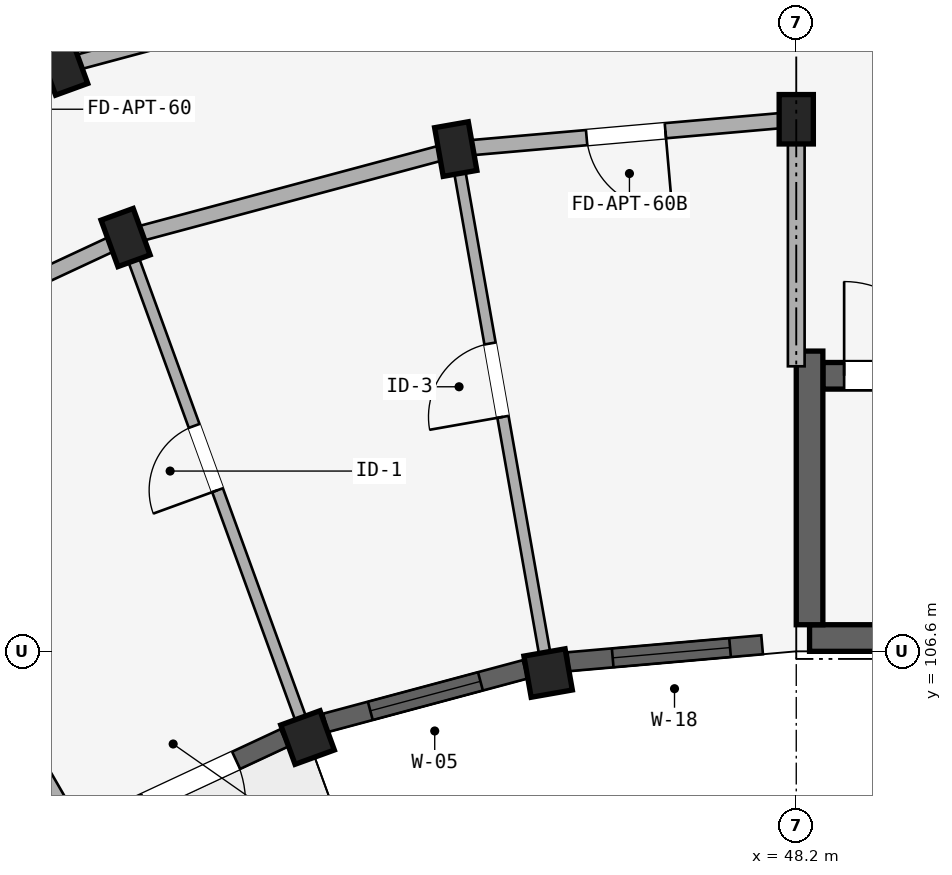
"""IFC4 building model, lengths in metres.
Left out: names, types, materials, properties, quantities, classifications, styles, units other than length and angle.
Written with IfcOpenShell. Run it as: python <this file> out.ifc"""

import sys

from ifc_helpers import new_model, si_unit, direction, frame, frame_2d, origin, origin_2d, place, context, subcontext, project, spatial, rectangle, extrude, element, fill, save


model = new_model("IFC4")
c1 = context("Model", 3, precision=1e-05, world=origin(), true_north=direction((0.0, 1.0)))
c2 = subcontext(c1, "Body", "Model", "MODEL_VIEW")
j1 = project(units=[si_unit("LENGTHUNIT", "METRE"), si_unit("PLANEANGLEUNIT", "RADIAN")], contexts=[c1])
p1 = place(None, origin())
s1 = spatial("IfcSite", under=j1, at=p1, CompositionType="ELEMENT")
p2 = place(p1, origin())
s2 = spatial("IfcBuilding", under=s1, at=p2, CompositionType="ELEMENT")
p3 = place(p2, frame((0.0, 0.0, 30.75)))
s3 = spatial("IfcBuildingStorey", under=s2, at=p3, CompositionType="ELEMENT", Elevation=30.75)
p4 = place(p3, frame((48.375, 106.775, 0.0), z_axis=(0.0, 0.0, 1.0), x_axis=(1.0, 0.0, 0.0)))
e1 = element("IfcWall", 1, at=p4, inside=s3, PredefinedType="SHEAR", context=c2, shape_type="SweptSolid", body=[
    extrude(rectangle(XDim=8.25, YDim=0.35, at=frame_2d((4.125, 0.0))), origin(), (0.0, 0.0, 1.0), 2.93),
])
p5 = place(p3, frame((48.55, 110.225, 0.0), z_axis=(0.0, 0.0, 1.0), x_axis=(1.0, 0.0, 0.0)))
e2 = element("IfcWall", 2, at=p5, inside=s3, PredefinedType="SHEAR", context=c2, shape_type="SweptSolid", body=[
    extrude(rectangle(XDim=7.9, YDim=0.35, at=frame_2d((3.95, 0.0))), origin(), (0.0, 0.0, 1.0), 2.93),
])
p6 = place(p5, frame((0.28, 0.0, 0.0)))
e3 = element("IfcOpeningElement", 3, at=p6, cuts=e2, PredefinedType="OPENING", context=c2, shape_type="SweptSolid", body=[
    extrude(rectangle(XDim=1.24, YDim=2.15, at=frame_2d((0.62, 1.075))), frame((0.0, 0.185, 0.0), z_axis=(0.0, -1.0, 0.0), x_axis=(1.0, 0.0, 0.0)), (0.0, 0.0, 1.0), 0.37),
])
p7 = place(p3, frame((48.375, 106.95, 0.0), z_axis=(0.0, 0.0, 1.0), x_axis=(0.0, 1.0, 0.0)))
e4 = element("IfcWall", 4, at=p7, inside=s3, PredefinedType="SHEAR", context=c2, shape_type="SweptSolid", body=[
    extrude(rectangle(XDim=3.6, YDim=0.35, at=frame_2d((1.8, 0.0))), origin(), (0.0, 0.0, 1.0), 2.93),
])
p8 = place(p3, frame((48.2, 113.6, 0.0), z_axis=(0.0, 0.0, 1.0), x_axis=(1.0, 0.0, 0.0)))
e5 = element("IfcColumn", 5, at=p8, inside=s3, PredefinedType="COLUMN", context=c2, shape_type="SweptSolid", body=[
    extrude(rectangle(XDim=0.45, YDim=0.65, at=origin_2d()), origin(), (0.0, 0.0, 1.0), 2.93),
])
p9 = place(p3, frame((44.935, 106.314, 0.0), z_axis=(0.0, 0.0, 1.0), x_axis=(0.984807753012, 0.173648177667, 0.0)))
e6 = element("IfcColumn", 6, at=p9, inside=s3, PredefinedType="COLUMN", context=c2, shape_type="SweptSolid", body=[
    extrude(rectangle(XDim=0.55, YDim=0.55, at=origin_2d()), origin(), (0.0, 0.0, 1.0), 2.93),
])
p10 = place(p3, frame((43.72, 113.208, 0.0), z_axis=(0.0, 0.0, 1.0), x_axis=(0.984807753012, 0.173648177667, 0.0)))
e7 = element("IfcColumn", 7, at=p10, inside=s3, PredefinedType="COLUMN", context=c2, shape_type="SweptSolid", body=[
    extrude(rectangle(XDim=0.45, YDim=0.65, at=origin_2d()), origin(), (0.0, 0.0, 1.0), 2.93),
])
p11 = place(p3, frame((41.77, 105.466, 0.0), z_axis=(0.0, 0.0, 1.0), x_axis=(0.939692620786, 0.342020143326, 0.0)))
e8 = element("IfcColumn", 8, at=p11, inside=s3, PredefinedType="COLUMN", context=c2, shape_type="SweptSolid", body=[
    extrude(rectangle(XDim=0.55, YDim=0.55, at=origin_2d()), origin(), (0.0, 0.0, 1.0), 2.93),
])
for number, where, z_axis, x_axis in (
    (9, (39.376, 112.044, 0.0), (0.0, 0.0, 1.0), (0.94, 0.342, 0.0)),
    (10, (38.555, 114.299, 0.0), (0.0, 0.0, 1.0), (0.94, 0.342, 0.0)),
):
    element("IfcColumn", number, at=place(p3, frame(where, z_axis=z_axis, x_axis=x_axis)), inside=s3, PredefinedType="COLUMN", context=c2, shape_type="SweptSolid", body=[
        extrude(rectangle(XDim=0.45, YDim=0.65, at=origin_2d()), origin(), (0.0, 0.0, 1.0), 2.93),
    ])
p12 = place(p3, frame((48.2, 113.6, 0.0), z_axis=(0.0, 0.0, 1.0), x_axis=(-0.996191949488, -0.087187153726, 0.0)))
e11 = element("IfcWall", 11, at=p12, inside=s3, PredefinedType="STANDARD", context=c2, shape_type="SweptSolid", body=[
    extrude(rectangle(XDim=4.497, YDim=0.2, at=frame_2d((2.249, 0.0))), origin(), (0.0, 0.0, 1.0), 2.372),
])
p13 = place(p12, frame((1.729, 0.0, 0.0)))
e12 = element("IfcOpeningElement", 12, at=p13, cuts=e11, PredefinedType="OPENING", context=c2, shape_type="SweptSolid", body=[
    extrude(rectangle(XDim=1.04, YDim=2.15, at=frame_2d((0.52, 1.075))), frame((0.0, 0.11, 0.0), z_axis=(0.0, -1.0, 0.0), x_axis=(1.0, 0.0, 0.0)), (0.0, 0.0, 1.0), 0.22),
])
p14 = place(p3, frame((43.72, 113.208, 0.0), z_axis=(0.0, 0.0, 1.0), x_axis=(-0.965934240054, -0.258787642463, 0.0)))
e13 = element("IfcWall", 13, at=p14, inside=s3, PredefinedType="STANDARD", context=c2, shape_type="SweptSolid", body=[
    extrude(rectangle(XDim=4.497, YDim=0.2, at=frame_2d((2.249, 0.0))), origin(), (0.0, 0.0, 1.0), 2.372),
])
p15 = place(p3, frame((43.303, 115.572, 0.0), z_axis=(0.0, 0.0, 1.0), x_axis=(-0.965930095386, -0.258803112091, 0.0)))
e14 = element("IfcWall", 14, at=p15, inside=s3, PredefinedType="STANDARD", context=c2, shape_type="SweptSolid", body=[
    extrude(rectangle(XDim=4.916, YDim=0.2, at=frame_2d((2.458, 0.0))), origin(), (0.0, 0.0, 1.0), 2.372),
])
p16 = place(p3, frame((39.376, 112.044, 0.0), z_axis=(0.0, 0.0, 1.0), x_axis=(-0.906307919131, -0.422617978463, 0.0)))
e15 = element("IfcWall", 15, at=p16, inside=s3, PredefinedType="STANDARD", context=c2, shape_type="SweptSolid", body=[
    extrude(rectangle(XDim=4.497, YDim=0.2, at=frame_2d((2.249, 0.0))), origin(), (0.0, 0.0, 1.0), 2.372),
])
p17 = place(p3, frame((38.555, 114.299, 0.0), z_axis=(0.0, 0.0, 1.0), x_axis=(-0.906302381024, -0.422629854778, 0.0)))
e16 = element("IfcWall", 16, at=p17, inside=s3, PredefinedType="STANDARD", context=c2, shape_type="SweptSolid", body=[
    extrude(rectangle(XDim=4.915, YDim=0.2, at=frame_2d((2.458, 0.0))), origin(), (0.0, 0.0, 1.0), 2.372),
])
p18 = place(p17, frame((1.958, 0.0, 0.0)))
e17 = element("IfcOpeningElement", 17, at=p18, cuts=e16, PredefinedType="OPENING", context=c2, shape_type="SweptSolid", body=[
    extrude(rectangle(XDim=1.0, YDim=2.15, at=frame_2d((0.5, 1.075))), frame((0.0, 0.11, 0.0), z_axis=(0.0, -1.0, 0.0), x_axis=(1.0, 0.0, 0.0)), (0.0, 0.0, 1.0), 0.22),
])
p19 = place(p3, frame((48.2, 110.35, 0.0), z_axis=(0.0, 0.0, 1.0), x_axis=(0.0, 1.0, 0.0)))
e18 = element("IfcWall", 18, at=p19, inside=s3, PredefinedType="STANDARD", context=c2, shape_type="SweptSolid", body=[
    extrude(rectangle(XDim=3.2, YDim=0.22, at=frame_2d((1.6, 0.0))), origin(), (0.0, 0.0, 1.0), 2.372),
])
p20 = place(p3, frame((44.901, 106.511, 0.0), z_axis=(0.0, 0.0, 1.0), x_axis=(-0.173647089161, 0.984807944945, 0.0)))
e19 = element("IfcWall", 19, at=p20, inside=s3, PredefinedType="PARTITIONING", context=c2, shape_type="SweptSolid", body=[
    extrude(rectangle(XDim=6.75, YDim=0.15, at=frame_2d((3.375, 0.0))), origin(), (0.0, 0.0, 1.0), 2.372),
])
p21 = place(p20, frame((3.222, 0.0, 0.0)))
e20 = element("IfcOpeningElement", 20, at=p21, cuts=e19, PredefinedType="OPENING", context=c2, shape_type="SweptSolid", body=[
    extrude(rectangle(XDim=0.98, YDim=2.12, at=frame_2d((0.49, 1.06))), frame((0.0, 0.085, 0.0), z_axis=(0.0, -1.0, 0.0), x_axis=(1.0, 0.0, 0.0)), (0.0, 0.0, 1.0), 0.17),
])
p22 = place(p3, frame((41.702, 105.654, 0.0), z_axis=(0.0, 0.0, 1.0), x_axis=(-0.342010221662, 0.939696231917, 0.0)))
e21 = element("IfcWall", 21, at=p22, inside=s3, PredefinedType="PARTITIONING", context=c2, shape_type="SweptSolid", body=[
    extrude(rectangle(XDim=6.75, YDim=0.15, at=frame_2d((3.375, 0.0))), origin(), (0.0, 0.0, 1.0), 2.372),
])
p23 = place(p22, frame((3.262, 0.0, 0.0)))
e22 = element("IfcOpeningElement", 22, at=p23, cuts=e21, PredefinedType="OPENING", context=c2, shape_type="SweptSolid", body=[
    extrude(rectangle(XDim=0.9, YDim=2.1, at=frame_2d((0.45, 1.05))), frame((0.0, 0.085, 0.0), z_axis=(0.0, -1.0, 0.0), x_axis=(1.0, 0.0, 0.0)), (0.0, 0.0, 1.0), 0.17),
])
p24 = place(p3, frame((38.521, 114.393, 0.0), z_axis=(0.0, 0.0, 1.0), x_axis=(-0.342022120477, 0.939691901159, 0.0)))
e23 = element("IfcWall", 23, at=p24, inside=s3, PredefinedType="STANDARD", context=c2, shape_type="SweptSolid", body=[
    extrude(rectangle(XDim=17.42, YDim=0.22, at=frame_2d((8.71, 0.0))), origin(), (0.0, 0.0, 1.0), 2.372),
])
p25 = place(p3, frame((38.7, 104.254, 0.0), z_axis=(0.0, 0.0, 1.0), x_axis=(-0.499997969693, 0.866026575979, 0.0)))
e24 = element("IfcWall", 24, at=p25, inside=s3, PredefinedType="STANDARD", context=c2, shape_type="SweptSolid", body=[
    extrude(rectangle(XDim=6.75, YDim=0.22, at=frame_2d((3.375, 0.0))), origin(), (0.0, 0.0, 1.0), 2.372),
])
p26 = place(p3, frame((47.751, 106.686, 0.0), z_axis=(0.0, 0.0, 1.0), x_axis=(-0.996188847542, -0.087222589008, 0.0)))
e25 = element("IfcWall", 25, at=p26, inside=s3, PredefinedType="STANDARD", context=c2, shape_type="SweptSolid", body=[
    extrude(rectangle(XDim=2.558, YDim=0.25, at=frame_2d((1.279, 0.0))), origin(), (0.0, 0.0, 1.0), 2.422),
])
p27 = place(p26, frame((0.424, 0.0, 0.622)))
e26 = element("IfcOpeningElement", 26, at=p27, cuts=e25, PredefinedType="OPENING", context=c2, shape_type="SweptSolid", body=[
    extrude(rectangle(XDim=1.55, YDim=1.6, at=frame_2d((0.775, 0.8))), frame((0.0, 0.135, 0.0), z_axis=(0.0, -1.0, 0.0), x_axis=(1.0, 0.0, 0.0)), (0.0, 0.0, 1.0), 0.27),
])
p28 = place(p3, frame((44.634, 106.363, 0.0), z_axis=(0.0, 0.0, 1.0), x_axis=(-0.965928818058, -0.258807879411, 0.0)))
e27 = element("IfcWall", 27, at=p28, inside=s3, PredefinedType="STANDARD", context=c2, shape_type="SweptSolid", body=[
    extrude(rectangle(XDim=2.72, YDim=0.25, at=frame_2d((1.36, 0.0))), origin(), (0.0, 0.0, 1.0), 2.422),
])
p29 = place(p28, frame((0.61, 0.0, 0.572)))
e28 = element("IfcOpeningElement", 28, at=p29, cuts=e27, PredefinedType="OPENING", context=c2, shape_type="SweptSolid", body=[
    extrude(rectangle(XDim=1.5, YDim=1.65, at=frame_2d((0.75, 0.825))), frame((0.0, 0.135, 0.0), z_axis=(0.0, -1.0, 0.0), x_axis=(1.0, 0.0, 0.0)), (0.0, 0.0, 1.0), 0.27),
])
p30 = place(p3, frame((41.465, 105.462, 0.0), z_axis=(0.0, 0.0, 1.0), x_axis=(-0.906302358412, -0.422629903269, 0.0)))
e29 = element("IfcWall", 29, at=p30, inside=s3, PredefinedType="STANDARD", context=c2, shape_type="SweptSolid", body=[
    extrude(rectangle(XDim=2.72, YDim=0.25, at=frame_2d((1.36, 0.0))), origin(), (0.0, 0.0, 1.0), 2.422),
])
p31 = place(p30, frame((0.7, 0.0, 0.0)))
e30 = element("IfcOpeningElement", 30, at=p31, cuts=e29, PredefinedType="OPENING", context=c2, shape_type="SweptSolid", body=[
    extrude(rectangle(XDim=1.32, YDim=2.15, at=frame_2d((0.66, 1.075))), frame((0.0, 0.135, 0.0), z_axis=(0.0, -1.0, 0.0), x_axis=(1.0, 0.0, 0.0)), (0.0, 0.0, 1.0), 0.27),
])
p32 = place(p27, origin())
e31 = element("IfcWindow", 31, at=p32, inside=s3, PartitioningType="DOUBLE_PANEL_VERTICAL", PredefinedType="WINDOW", context=c2, shape_type="SweptSolid", body=[
    extrude(rectangle(XDim=1.55, YDim=1.6, at=frame_2d((0.775, 0.8))), frame((0.0, 0.03, 0.0), z_axis=(0.0, -1.0, 0.0), x_axis=(1.0, 0.0, 0.0)), (0.0, 0.0, 1.0), 0.06),
])
fill(e26, e31)
p33 = place(p29, origin())
e32 = element("IfcWindow", 32, at=p33, inside=s3, PartitioningType="DOUBLE_PANEL_VERTICAL", PredefinedType="WINDOW", context=c2, shape_type="SweptSolid", body=[
    extrude(rectangle(XDim=1.5, YDim=1.65, at=frame_2d((0.75, 0.825))), frame((0.0, 0.03, 0.0), z_axis=(0.0, -1.0, 0.0), x_axis=(1.0, 0.0, 0.0)), (0.0, 0.0, 1.0), 0.06),
])
fill(e28, e32)
p34 = place(p6, frame((1.24, 0.0, 0.0), z_axis=(0.0, 0.0, 1.0), x_axis=(-1.0, 0.0, 0.0)))
e33 = element("IfcDoor", 33, at=p34, inside=s3, OperationType="SINGLE_SWING_RIGHT", PredefinedType="DOOR", context=c2, shape_type="SweptSolid", body=[
    extrude(rectangle(XDim=1.24, YDim=2.15, at=frame_2d((0.62, 1.075))), frame((0.0, 0.025, 0.0), z_axis=(0.0, -1.0, 0.0), x_axis=(1.0, 0.0, 0.0)), (0.0, 0.0, 1.0), 0.05),
])
fill(e3, e33)
p35 = place(p21, frame((0.98, 0.0, 0.0), z_axis=(0.0, 0.0, 1.0), x_axis=(-1.0, 0.0, 0.0)))
e34 = element("IfcDoor", 34, at=p35, inside=s3, OperationType="SINGLE_SWING_RIGHT", PredefinedType="DOOR", context=c2, shape_type="SweptSolid", body=[
    extrude(rectangle(XDim=0.98, YDim=2.12, at=frame_2d((0.49, 1.06))), frame((0.0, 0.025, 0.0), z_axis=(0.0, -1.0, 0.0), x_axis=(1.0, 0.0, 0.0)), (0.0, 0.0, 1.0), 0.05),
])
fill(e20, e34)
p36 = place(p23, frame((0.9, 0.0, 0.0), z_axis=(0.0, 0.0, 1.0), x_axis=(-1.0, 0.0, 0.0)))
e35 = element("IfcDoor", 35, at=p36, inside=s3, OperationType="SINGLE_SWING_RIGHT", PredefinedType="DOOR", context=c2, shape_type="SweptSolid", body=[
    extrude(rectangle(XDim=0.9, YDim=2.1, at=frame_2d((0.45, 1.05))), frame((0.0, 0.025, 0.0), z_axis=(0.0, -1.0, 0.0), x_axis=(1.0, 0.0, 0.0)), (0.0, 0.0, 1.0), 0.05),
])
fill(e22, e35)
p37 = place(p13, frame((1.04, 0.0, 0.0), z_axis=(0.0, 0.0, 1.0), x_axis=(-1.0, 0.0, 0.0)))
e36 = element("IfcDoor", 36, at=p37, inside=s3, OperationType="SINGLE_SWING_RIGHT", PredefinedType="DOOR", context=c2, shape_type="SweptSolid", body=[
    extrude(rectangle(XDim=1.04, YDim=2.15, at=frame_2d((0.52, 1.075))), frame((0.0, 0.025, 0.0), z_axis=(0.0, -1.0, 0.0), x_axis=(1.0, 0.0, 0.0)), (0.0, 0.0, 1.0), 0.05),
])
fill(e12, e36)
p38 = place(p31, origin())
e37 = element("IfcDoor", 37, at=p38, inside=s3, OperationType="SINGLE_SWING_RIGHT", PredefinedType="DOOR", context=c2, shape_type="SweptSolid", body=[
    extrude(rectangle(XDim=1.32, YDim=2.15, at=frame_2d((0.66, 1.075))), frame((0.0, 0.025, 0.0), z_axis=(0.0, -1.0, 0.0), x_axis=(1.0, 0.0, 0.0)), (0.0, 0.0, 1.0), 0.05),
])
fill(e30, e37)
save(model, sys.argv[1])
